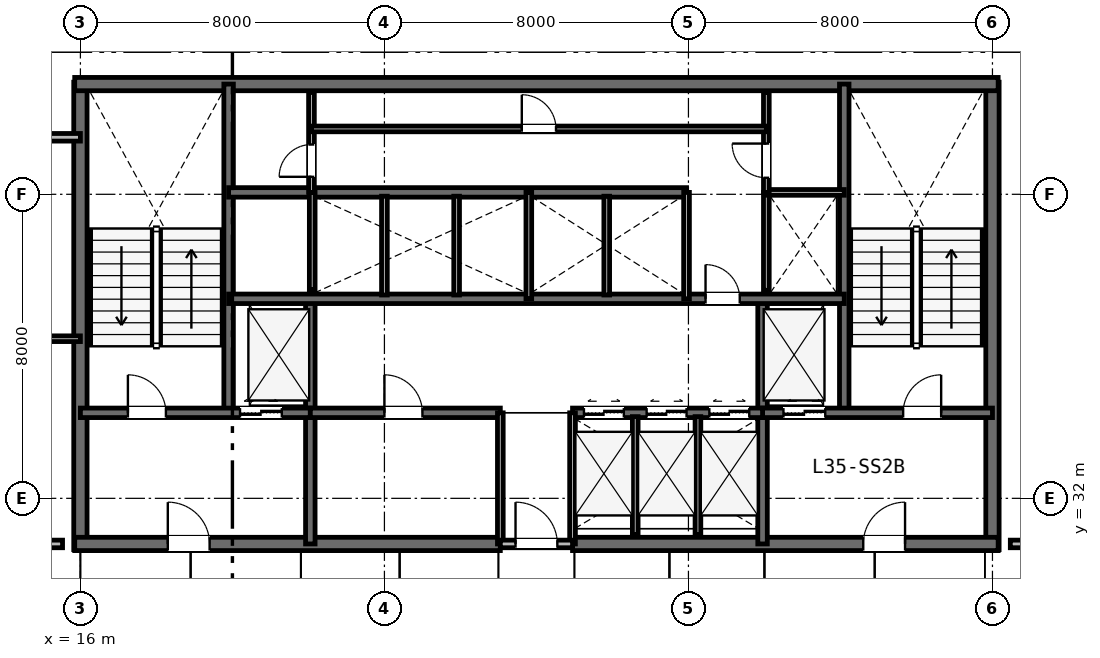
"""IFC4 building model, lengths in metres.
Left out: names, types, materials, properties, quantities, classifications, styles, units other than length and angle.
Written with IfcOpenShell. Run it as: python <this file> out.ifc"""

import sys

from ifc_helpers import new_model, si_unit, direction, frame, frame_2d, origin, place, context, subcontext, project, spatial, rectangle, extrude, element, fill, save


model = new_model("IFC4")
c1 = context("Model", 3, precision=1e-05, world=origin(), true_north=direction((0.0, 1.0)))
c2 = subcontext(c1, "Body", "Model", "MODEL_VIEW")
j1 = project(units=[si_unit("LENGTHUNIT", "METRE"), si_unit("PLANEANGLEUNIT", "RADIAN")], contexts=[c1])
p1 = place(None, origin())
s1 = spatial("IfcSite", under=j1, at=p1, CompositionType="ELEMENT")
p2 = place(p1, origin())
s2 = spatial("IfcBuilding", under=s1, at=p2, CompositionType="ELEMENT")
p3 = place(p2, frame((0.0, 0.0, 136.8)))
s3 = spatial("IfcBuildingStorey", under=s2, at=p3, CompositionType="ELEMENT", Elevation=136.8)
for number, where, z_axis, x_axis in (
    (1, (16.0, 30.65, 0.0), (0.0, 0.0, 1.0), (0.0, 1.0, 0.0)),
    (2, (40.0, 30.65, 0.0), (0.0, 0.0, 1.0), (0.0, 1.0, 0.0)),
):
    element("IfcWall", number, at=place(p3, frame(where, z_axis=z_axis, x_axis=x_axis)), inside=s3, PredefinedType="SHEAR", context=c2, shape_type="SweptSolid", body=[
        extrude(rectangle(XDim=12.3, YDim=0.35, at=frame_2d((6.15, 0.0))), origin(), (0.0, 0.0, 1.0), 3.6),
    ])
p4 = place(p3, frame((15.85, 42.9, 0.0), z_axis=(0.0, 0.0, 1.0), x_axis=(1.0, 0.0, 0.0)))
e3 = element("IfcWall", 3, at=p4, inside=s3, PredefinedType="SHEAR", context=c2, shape_type="SweptSolid", body=[
    extrude(rectangle(XDim=24.3, YDim=0.35, at=frame_2d((12.15, 0.0))), origin(), (0.0, 0.0, 1.0), 3.6),
])
p5 = place(p3, frame((15.85, 30.8, 0.0), z_axis=(0.0, 0.0, 1.0), x_axis=(1.0, 0.0, 0.0)))
e4 = element("IfcWall", 4, at=p5, inside=s3, PredefinedType="SHEAR", context=c2, shape_type="SweptSolid", body=[
    extrude(rectangle(XDim=11.2, YDim=0.35, at=frame_2d((5.6, 0.0))), origin(), (0.0, 0.0, 1.0), 3.6),
])
p6 = place(p5, frame((2.45, 0.0, 0.0)))
e5 = element("IfcOpeningElement", 5, at=p6, cuts=e4, PredefinedType="OPENING", context=c2, shape_type="SweptSolid", body=[
    extrude(rectangle(XDim=1.1, YDim=2.15, at=frame_2d((0.55, 1.075))), frame((0.0, 0.185, 0.0), z_axis=(0.0, -1.0, 0.0), x_axis=(1.0, 0.0, 0.0)), (0.0, 0.0, 1.0), 0.37),
])
p7 = place(p3, frame((28.95, 30.8, 0.0), z_axis=(0.0, 0.0, 1.0), x_axis=(1.0, 0.0, 0.0)))
e6 = element("IfcWall", 6, at=p7, inside=s3, PredefinedType="SHEAR", context=c2, shape_type="SweptSolid", body=[
    extrude(rectangle(XDim=11.2, YDim=0.35, at=frame_2d((5.6, 0.0))), origin(), (0.0, 0.0, 1.0), 3.6),
])
p8 = place(p7, frame((7.65, 0.0, 0.0)))
e7 = element("IfcOpeningElement", 7, at=p8, cuts=e6, PredefinedType="OPENING", context=c2, shape_type="SweptSolid", body=[
    extrude(rectangle(XDim=1.1, YDim=2.15, at=frame_2d((0.55, 1.075))), frame((0.0, 0.185, 0.0), z_axis=(0.0, -1.0, 0.0), x_axis=(1.0, 0.0, 0.0)), (0.0, 0.0, 1.0), 0.37),
])
for number, where, z_axis, x_axis in (
    (8, (19.9, 34.25, 0.0), (0.0, 0.0, 1.0), (0.0, 1.0, 0.0)),
    (9, (36.1, 34.25, 0.0), (0.0, 0.0, 1.0), (0.0, 1.0, 0.0)),
):
    element("IfcWall", number, at=place(p3, frame(where, z_axis=z_axis, x_axis=x_axis)), inside=s3, PredefinedType="SHEAR", context=c2, shape_type="SweptSolid", body=[
        extrude(rectangle(XDim=8.65, YDim=0.25, at=frame_2d((4.325, 0.0))), origin(), (0.0, 0.0, 1.0), 3.6),
    ])
for number, where, z_axis, x_axis in (
    (10, (22.05, 30.8, 0.0), (0.0, 0.0, 1.0), (0.0, 1.0, 0.0)),
    (11, (33.95, 30.8, 0.0), (0.0, 0.0, 1.0), (0.0, 1.0, 0.0)),
):
    element("IfcWall", number, at=place(p3, frame(where, z_axis=z_axis, x_axis=x_axis)), inside=s3, PredefinedType="SHEAR", context=c2, shape_type="SweptSolid", body=[
        extrude(rectangle(XDim=6.45, YDim=0.25, at=frame_2d((3.225, 0.0))), origin(), (0.0, 0.0, 1.0), 3.6),
    ])
p9 = place(p3, frame((16.0, 34.25, 0.0), z_axis=(0.0, 0.0, 1.0), x_axis=(1.0, 0.0, 0.0)))
e12 = element("IfcWall", 12, at=p9, inside=s3, PredefinedType="SHEAR", context=c2, shape_type="SweptSolid", body=[
    extrude(rectangle(XDim=6.05, YDim=0.25, at=frame_2d((3.025, 0.0))), origin(), (0.0, 0.0, 1.0), 3.6),
])
p10 = place(p9, frame((1.25, 0.0, 0.0)))
e13 = element("IfcOpeningElement", 13, at=p10, cuts=e12, PredefinedType="OPENING", context=c2, shape_type="SweptSolid", body=[
    extrude(rectangle(XDim=1.0, YDim=2.15, at=frame_2d((0.5, 1.075))), frame((0.0, 0.135, 0.0), z_axis=(0.0, -1.0, 0.0), x_axis=(1.0, 0.0, 0.0)), (0.0, 0.0, 1.0), 0.27),
])
p11 = place(p9, frame((4.2, 0.0, 0.0)))
e14 = element("IfcOpeningElement", 14, at=p11, cuts=e12, PredefinedType="OPENING", context=c2, shape_type="SweptSolid", body=[
    extrude(rectangle(XDim=1.1, YDim=2.15, at=frame_2d((0.55, 1.075))), frame((0.0, 0.135, 0.0), z_axis=(0.0, -1.0, 0.0), x_axis=(1.0, 0.0, 0.0)), (0.0, 0.0, 1.0), 0.27),
])
p12 = place(p3, frame((33.95, 34.25, 0.0), z_axis=(0.0, 0.0, 1.0), x_axis=(1.0, 0.0, 0.0)))
e15 = element("IfcWall", 15, at=p12, inside=s3, PredefinedType="SHEAR", context=c2, shape_type="SweptSolid", body=[
    extrude(rectangle(XDim=6.05, YDim=0.25, at=frame_2d((3.025, 0.0))), origin(), (0.0, 0.0, 1.0), 3.6),
])
p13 = place(p12, frame((3.7, 0.0, 0.0)))
e16 = element("IfcOpeningElement", 16, at=p13, cuts=e15, PredefinedType="OPENING", context=c2, shape_type="SweptSolid", body=[
    extrude(rectangle(XDim=1.0, YDim=2.15, at=frame_2d((0.5, 1.075))), frame((0.0, 0.135, 0.0), z_axis=(0.0, -1.0, 0.0), x_axis=(1.0, 0.0, 0.0)), (0.0, 0.0, 1.0), 0.27),
])
p14 = place(p12, frame((0.55, 0.0, 0.0)))
e17 = element("IfcOpeningElement", 17, at=p14, cuts=e15, PredefinedType="OPENING", context=c2, shape_type="SweptSolid", body=[
    extrude(rectangle(XDim=1.1, YDim=2.15, at=frame_2d((0.55, 1.075))), frame((0.0, 0.135, 0.0), z_axis=(0.0, -1.0, 0.0), x_axis=(1.0, 0.0, 0.0)), (0.0, 0.0, 1.0), 0.27),
])
p15 = place(p3, frame((22.05, 34.25, 0.0), z_axis=(0.0, 0.0, 1.0), x_axis=(1.0, 0.0, 0.0)))
e18 = element("IfcWall", 18, at=p15, inside=s3, PredefinedType="SHEAR", context=c2, shape_type="SweptSolid", body=[
    extrude(rectangle(XDim=5.0, YDim=0.25, at=frame_2d((2.5, 0.0))), origin(), (0.0, 0.0, 1.0), 3.6),
])
p16 = place(p15, frame((1.95, 0.0, 0.0)))
e19 = element("IfcOpeningElement", 19, at=p16, cuts=e18, PredefinedType="OPENING", context=c2, shape_type="SweptSolid", body=[
    extrude(rectangle(XDim=1.0, YDim=2.15, at=frame_2d((0.5, 1.075))), frame((0.0, 0.135, 0.0), z_axis=(0.0, -1.0, 0.0), x_axis=(1.0, 0.0, 0.0)), (0.0, 0.0, 1.0), 0.27),
])
p17 = place(p3, frame((28.95, 34.25, 0.0), z_axis=(0.0, 0.0, 1.0), x_axis=(1.0, 0.0, 0.0)))
e20 = element("IfcWall", 20, at=p17, inside=s3, PredefinedType="SHEAR", context=c2, shape_type="SweptSolid", body=[
    extrude(rectangle(XDim=5.0, YDim=0.25, at=frame_2d((2.5, 0.0))), origin(), (0.0, 0.0, 1.0), 3.6),
])
p18 = place(p17, frame((0.3, 0.0, 0.0)))
e21 = element("IfcOpeningElement", 21, at=p18, cuts=e20, PredefinedType="OPENING", context=c2, shape_type="SweptSolid", body=[
    extrude(rectangle(XDim=1.05, YDim=2.15, at=frame_2d((0.525, 1.075))), frame((0.0, 0.135, 0.0), z_axis=(0.0, -1.0, 0.0), x_axis=(1.0, 0.0, 0.0)), (0.0, 0.0, 1.0), 0.27),
])
p19 = place(p17, frame((1.95, 0.0, 0.0)))
e22 = element("IfcOpeningElement", 22, at=p19, cuts=e20, PredefinedType="OPENING", context=c2, shape_type="SweptSolid", body=[
    extrude(rectangle(XDim=1.05, YDim=2.15, at=frame_2d((0.525, 1.075))), frame((0.0, 0.135, 0.0), z_axis=(0.0, -1.0, 0.0), x_axis=(1.0, 0.0, 0.0)), (0.0, 0.0, 1.0), 0.27),
])
p20 = place(p17, frame((3.6, 0.0, 0.0)))
e23 = element("IfcOpeningElement", 23, at=p20, cuts=e20, PredefinedType="OPENING", context=c2, shape_type="SweptSolid", body=[
    extrude(rectangle(XDim=1.05, YDim=2.15, at=frame_2d((0.525, 1.075))), frame((0.0, 0.135, 0.0), z_axis=(0.0, -1.0, 0.0), x_axis=(1.0, 0.0, 0.0)), (0.0, 0.0, 1.0), 0.27),
])
p21 = place(p3, frame((19.9, 37.25, 0.0), z_axis=(0.0, 0.0, 1.0), x_axis=(1.0, 0.0, 0.0)))
e24 = element("IfcWall", 24, at=p21, inside=s3, PredefinedType="SHEAR", context=c2, shape_type="SweptSolid", body=[
    extrude(rectangle(XDim=16.2, YDim=0.25, at=frame_2d((8.1, 0.0))), origin(), (0.0, 0.0, 1.0), 3.6),
])
p22 = place(p21, frame((12.55, 0.0, 0.0)))
e25 = element("IfcOpeningElement", 25, at=p22, cuts=e24, PredefinedType="OPENING", context=c2, shape_type="SweptSolid", body=[
    extrude(rectangle(XDim=0.9, YDim=2.15, at=frame_2d((0.45, 1.075))), frame((0.0, 0.135, 0.0), z_axis=(0.0, -1.0, 0.0), x_axis=(1.0, 0.0, 0.0)), (0.0, 0.0, 1.0), 0.27),
])
p23 = place(p3, frame((19.9, 40.05, 0.0), z_axis=(0.0, 0.0, 1.0), x_axis=(1.0, 0.0, 0.0)))
e26 = element("IfcWall", 26, at=p23, inside=s3, PredefinedType="SHEAR", context=c2, shape_type="SweptSolid", body=[
    extrude(rectangle(XDim=12.05, YDim=0.25, at=frame_2d((6.025, 0.0))), origin(), (0.0, 0.0, 1.0), 3.6),
])
p24 = place(p3, frame((27.05, 30.8, 0.0), z_axis=(0.0, 0.0, 1.0), x_axis=(0.0, 1.0, 0.0)))
e27 = element("IfcWall", 27, at=p24, inside=s3, PredefinedType="PLUMBINGWALL", context=c2, shape_type="SweptSolid", body=[
    extrude(rectangle(XDim=3.45, YDim=0.15, at=frame_2d((1.725, 0.0))), origin(), (0.0, 0.0, 1.0), 2.96),
])
p25 = place(p3, frame((28.95, 30.8, 0.0), z_axis=(0.0, 0.0, 1.0), x_axis=(0.0, 1.0, 0.0)))
e28 = element("IfcWall", 28, at=p25, inside=s3, PredefinedType="PLUMBINGWALL", context=c2, shape_type="SweptSolid", body=[
    extrude(rectangle(XDim=3.45, YDim=0.15, at=frame_2d((1.725, 0.0))), origin(), (0.0, 0.0, 1.0), 3.33),
])
p26 = place(p3, frame((27.05, 30.8, 0.0), z_axis=(0.0, 0.0, 1.0), x_axis=(1.0, 0.0, 0.0)))
e29 = element("IfcWall", 29, at=p26, inside=s3, PredefinedType="PARTITIONING", context=c2, shape_type="SweptSolid", body=[
    extrude(rectangle(XDim=1.9, YDim=0.2, at=frame_2d((0.95, 0.0))), origin(), (0.0, 0.0, 1.0), 2.96),
])
p27 = place(p26, frame((0.4, 0.0, 0.0)))
e30 = element("IfcOpeningElement", 30, at=p27, cuts=e29, PredefinedType="OPENING", context=c2, shape_type="SweptSolid", body=[
    extrude(rectangle(XDim=1.1, YDim=2.15, at=frame_2d((0.55, 1.075))), frame((0.0, 0.11, 0.0), z_axis=(0.0, -1.0, 0.0), x_axis=(1.0, 0.0, 0.0)), (0.0, 0.0, 1.0), 0.22),
])
for number, where, z_axis, x_axis in (
    (31, (30.6, 31.05, 0.0), (0.0, 0.0, 1.0), (0.0, 1.0, 0.0)),
    (32, (32.25, 31.05, 0.0), (0.0, 0.0, 1.0), (0.0, 1.0, 0.0)),
):
    element("IfcWall", number, at=place(p3, frame(where, z_axis=z_axis, x_axis=x_axis)), inside=s3, PredefinedType="PLUMBINGWALL", context=c2, shape_type="SweptSolid", body=[
        extrude(rectangle(XDim=3.1, YDim=0.15, at=frame_2d((1.55, 0.0))), origin(), (0.0, 0.0, 1.0), 3.33),
    ])
p28 = place(p3, frame((22.1, 37.49, 0.0), z_axis=(0.0, 0.0, 1.0), x_axis=(0.0, 1.0, 0.0)))
e33 = element("IfcWall", 33, at=p28, inside=s3, PredefinedType="PLUMBINGWALL", context=c2, shape_type="SweptSolid", body=[
    extrude(rectangle(XDim=2.56, YDim=0.15, at=frame_2d((1.28, 0.0))), origin(), (0.0, 0.0, 1.0), 3.33),
])
p29 = place(p3, frame((27.8, 37.25, 0.0), z_axis=(0.0, 0.0, 1.0), x_axis=(0.0, 1.0, 0.0)))
e34 = element("IfcWall", 34, at=p29, inside=s3, PredefinedType="PLUMBINGWALL", context=c2, shape_type="SweptSolid", body=[
    extrude(rectangle(XDim=2.8, YDim=0.15, at=frame_2d((1.4, 0.0))), origin(), (0.0, 0.0, 1.0), 3.33),
])
for number, where, z_axis, x_axis in (
    (35, (24.0, 37.35, 0.0), (0.0, 0.0, 1.0), (0.0, 1.0, 0.0)),
    (36, (25.9, 37.35, 0.0), (0.0, 0.0, 1.0), (0.0, 1.0, 0.0)),
):
    element("IfcWall", number, at=place(p3, frame(where, z_axis=z_axis, x_axis=x_axis)), inside=s3, PredefinedType="PLUMBINGWALL", context=c2, shape_type="SweptSolid", body=[
        extrude(rectangle(XDim=2.6, YDim=0.15, at=frame_2d((1.3, 0.0))), origin(), (0.0, 0.0, 1.0), 3.33),
    ])
p30 = place(p3, frame((31.95, 37.25, 0.0), z_axis=(0.0, 0.0, 1.0), x_axis=(0.0, 1.0, 0.0)))
e37 = element("IfcWall", 37, at=p30, inside=s3, PredefinedType="PLUMBINGWALL", context=c2, shape_type="SweptSolid", body=[
    extrude(rectangle(XDim=2.8, YDim=0.15, at=frame_2d((1.4, 0.0))), origin(), (0.0, 0.0, 1.0), 3.33),
])
p31 = place(p3, frame((29.85, 37.35, 0.0), z_axis=(0.0, 0.0, 1.0), x_axis=(0.0, 1.0, 0.0)))
e38 = element("IfcWall", 38, at=p31, inside=s3, PredefinedType="PLUMBINGWALL", context=c2, shape_type="SweptSolid", body=[
    extrude(rectangle(XDim=2.6, YDim=0.15, at=frame_2d((1.3, 0.0))), origin(), (0.0, 0.0, 1.0), 3.33),
])
p32 = place(p3, frame((34.05, 37.473, 0.0), z_axis=(0.0, 0.0, 1.0), x_axis=(0.0, 1.0, 0.0)))
e39 = element("IfcWall", 39, at=p32, inside=s3, PredefinedType="PLUMBINGWALL", context=c2, shape_type="SweptSolid", body=[
    extrude(rectangle(XDim=2.577, YDim=0.15, at=frame_2d((1.288, 0.0))), origin(), (0.0, 0.0, 1.0), 3.33),
])
p33 = place(p3, frame((34.05, 40.05, 0.0), z_axis=(0.0, 0.0, 1.0), x_axis=(1.0, 0.0, 0.0)))
e40 = element("IfcWall", 40, at=p33, inside=s3, PredefinedType="PARTITIONING", context=c2, shape_type="SweptSolid", body=[
    extrude(rectangle(XDim=2.05, YDim=0.15, at=frame_2d((1.025, 0.0))), origin(), (0.0, 0.0, 1.0), 3.33),
])
p34 = place(p3, frame((34.05, 40.05, 0.0), z_axis=(0.0, 0.0, 1.0), x_axis=(0.0, 1.0, 0.0)))
e41 = element("IfcWall", 41, at=p34, inside=s3, PredefinedType="PARTITIONING", context=c2, shape_type="SweptSolid", body=[
    extrude(rectangle(XDim=2.63, YDim=0.15, at=frame_2d((1.315, 0.0))), origin(), (0.0, 0.0, 1.0), 3.33),
])
p35 = place(p34, frame((0.385, 0.0, 0.0)))
e42 = element("IfcOpeningElement", 42, at=p35, cuts=e41, PredefinedType="OPENING", context=c2, shape_type="SweptSolid", body=[
    extrude(rectangle(XDim=0.9, YDim=2.15, at=frame_2d((0.45, 1.075))), frame((0.0, 0.085, 0.0), z_axis=(0.0, -1.0, 0.0), x_axis=(1.0, 0.0, 0.0)), (0.0, 0.0, 1.0), 0.17),
])
p36 = place(p3, frame((22.08, 40.05, 0.0), z_axis=(0.0, 0.0, 1.0), x_axis=(0.0, 1.0, 0.0)))
e43 = element("IfcWall", 43, at=p36, inside=s3, PredefinedType="PARTITIONING", context=c2, shape_type="SweptSolid", body=[
    extrude(rectangle(XDim=2.63, YDim=0.15, at=frame_2d((1.315, 0.0))), origin(), (0.0, 0.0, 1.0), 3.33),
])
p37 = place(p36, frame((0.41, 0.0, 0.0)))
e44 = element("IfcOpeningElement", 44, at=p37, cuts=e43, PredefinedType="OPENING", context=c2, shape_type="SweptSolid", body=[
    extrude(rectangle(XDim=0.85, YDim=2.15, at=frame_2d((0.425, 1.075))), frame((0.0, 0.085, 0.0), z_axis=(0.0, -1.0, 0.0), x_axis=(1.0, 0.0, 0.0)), (0.0, 0.0, 1.0), 0.17),
])
p38 = place(p3, frame((22.08, 41.72, 0.0), z_axis=(0.0, 0.0, 1.0), x_axis=(1.0, 0.0, 0.0)))
e45 = element("IfcWall", 45, at=p38, inside=s3, PredefinedType="PARTITIONING", context=c2, shape_type="SweptSolid", body=[
    extrude(rectangle(XDim=11.97, YDim=0.15, at=frame_2d((5.985, 0.0))), origin(), (0.0, 0.0, 1.0), 3.33),
])
p39 = place(p38, frame((5.535, 0.0, 0.0)))
e46 = element("IfcOpeningElement", 46, at=p39, cuts=e45, PredefinedType="OPENING", context=c2, shape_type="SweptSolid", body=[
    extrude(rectangle(XDim=0.9, YDim=2.15, at=frame_2d((0.45, 1.075))), frame((0.0, 0.085, 0.0), z_axis=(0.0, -1.0, 0.0), x_axis=(1.0, 0.0, 0.0)), (0.0, 0.0, 1.0), 0.17),
])
p40 = place(p3, frame((11.4, 30.8, 0.0), z_axis=(0.0, 0.0, 1.0), x_axis=(1.0, 0.0, 0.0)))
e47 = element("IfcWall", 47, at=p40, inside=s3, PredefinedType="PARTITIONING", context=c2, shape_type="SweptSolid", body=[
    extrude(rectangle(XDim=4.13, YDim=0.2, at=frame_2d((2.065, 0.0))), origin(), (0.0, 0.0, 1.0), 2.93),
])
p41 = place(p3, frame((40.47, 30.8, 0.0), z_axis=(0.0, 0.0, 1.0), x_axis=(1.0, 0.0, 0.0)))
e48 = element("IfcWall", 48, at=p41, inside=s3, PredefinedType="PARTITIONING", context=c2, shape_type="SweptSolid", body=[
    extrude(rectangle(XDim=1.73, YDim=0.2, at=frame_2d((0.865, 0.0))), origin(), (0.0, 0.0, 1.0), 2.93),
])
p42 = place(p3, frame((0.1, 41.5, 0.0), z_axis=(0.0, 0.0, 1.0), x_axis=(1.0, 0.0, 0.0)))
e49 = element("IfcWall", 49, at=p42, inside=s3, PredefinedType="PARTITIONING", context=c2, shape_type="SweptSolid", body=[
    extrude(rectangle(XDim=15.9, YDim=0.2, at=frame_2d((7.95, 0.0))), origin(), (0.0, 0.0, 1.0), 2.93),
])
p43 = place(p42, frame((9.877, 0.0, 0.0)))
e50 = element("IfcOpeningElement", 50, at=p43, cuts=e49, PredefinedType="OPENING", context=c2, shape_type="SweptSolid", body=[
    extrude(rectangle(XDim=0.95, YDim=2.15, at=frame_2d((0.475, 1.075))), frame((0.0, 0.11, 0.0), z_axis=(0.0, -1.0, 0.0), x_axis=(1.0, 0.0, 0.0)), (0.0, 0.0, 1.0), 0.22),
])
p44 = place(p3, frame((11.4, 36.2, 0.0), z_axis=(0.0, 0.0, 1.0), x_axis=(1.0, 0.0, 0.0)))
e51 = element("IfcWall", 51, at=p44, inside=s3, PredefinedType="PARTITIONING", context=c2, shape_type="SweptSolid", body=[
    extrude(rectangle(XDim=4.6, YDim=0.15, at=frame_2d((2.3, 0.0))), origin(), (0.0, 0.0, 1.0), 3.33),
])
p45 = place(p27, origin())
e52 = element("IfcDoor", 52, at=p45, inside=s3, OperationType="SINGLE_SWING_LEFT", PredefinedType="DOOR", context=c2, shape_type="SweptSolid", body=[
    extrude(rectangle(XDim=1.1, YDim=2.15, at=frame_2d((0.55, 1.075))), frame((0.0, 0.025, 0.0), z_axis=(0.0, -1.0, 0.0), x_axis=(1.0, 0.0, 0.0)), (0.0, 0.0, 1.0), 0.05),
])
fill(e30, e52)
p46 = place(p10, origin())
e53 = element("IfcDoor", 53, at=p46, inside=s3, OperationType="SINGLE_SWING_LEFT", PredefinedType="DOOR", context=c2, shape_type="SweptSolid", body=[
    extrude(rectangle(XDim=1.0, YDim=2.15, at=frame_2d((0.5, 1.075))), frame((0.0, 0.025, 0.0), z_axis=(0.0, -1.0, 0.0), x_axis=(1.0, 0.0, 0.0)), (0.0, 0.0, 1.0), 0.05),
])
fill(e13, e53)
p47 = place(p13, origin())
e54 = element("IfcDoor", 54, at=p47, inside=s3, OperationType="SINGLE_SWING_RIGHT", PredefinedType="DOOR", context=c2, shape_type="SweptSolid", body=[
    extrude(rectangle(XDim=1.0, YDim=2.15, at=frame_2d((0.5, 1.075))), frame((0.0, 0.025, 0.0), z_axis=(0.0, -1.0, 0.0), x_axis=(1.0, 0.0, 0.0)), (0.0, 0.0, 1.0), 0.05),
])
fill(e16, e54)
p48 = place(p6, origin())
e55 = element("IfcDoor", 55, at=p48, inside=s3, OperationType="SINGLE_SWING_LEFT", PredefinedType="DOOR", context=c2, shape_type="SweptSolid", body=[
    extrude(rectangle(XDim=1.1, YDim=2.15, at=frame_2d((0.55, 1.075))), frame((0.0, 0.025, 0.0), z_axis=(0.0, -1.0, 0.0), x_axis=(1.0, 0.0, 0.0)), (0.0, 0.0, 1.0), 0.05),
])
fill(e5, e55)
p49 = place(p8, origin())
e56 = element("IfcDoor", 56, at=p49, inside=s3, OperationType="SINGLE_SWING_RIGHT", PredefinedType="DOOR", context=c2, shape_type="SweptSolid", body=[
    extrude(rectangle(XDim=1.1, YDim=2.15, at=frame_2d((0.55, 1.075))), frame((0.0, 0.025, 0.0), z_axis=(0.0, -1.0, 0.0), x_axis=(1.0, 0.0, 0.0)), (0.0, 0.0, 1.0), 0.05),
])
fill(e7, e56)
p50 = place(p16, origin())
e57 = element("IfcDoor", 57, at=p50, inside=s3, OperationType="SINGLE_SWING_LEFT", PredefinedType="DOOR", context=c2, shape_type="SweptSolid", body=[
    extrude(rectangle(XDim=1.0, YDim=2.15, at=frame_2d((0.5, 1.075))), frame((0.0, 0.025, 0.0), z_axis=(0.0, -1.0, 0.0), x_axis=(1.0, 0.0, 0.0)), (0.0, 0.0, 1.0), 0.05),
])
fill(e19, e57)
p51 = place(p22, origin())
e58 = element("IfcDoor", 58, at=p51, inside=s3, OperationType="SINGLE_SWING_LEFT", PredefinedType="DOOR", context=c2, shape_type="SweptSolid", body=[
    extrude(rectangle(XDim=0.9, YDim=2.15, at=frame_2d((0.45, 1.075))), frame((0.0, 0.025, 0.0), z_axis=(0.0, -1.0, 0.0), x_axis=(1.0, 0.0, 0.0)), (0.0, 0.0, 1.0), 0.05),
])
fill(e25, e58)
p52 = place(p35, origin())
e59 = element("IfcDoor", 59, at=p52, inside=s3, OperationType="SINGLE_SWING_RIGHT", PredefinedType="DOOR", context=c2, shape_type="SweptSolid", body=[
    extrude(rectangle(XDim=0.9, YDim=2.15, at=frame_2d((0.45, 1.075))), frame((0.0, 0.025, 0.0), z_axis=(0.0, -1.0, 0.0), x_axis=(1.0, 0.0, 0.0)), (0.0, 0.0, 1.0), 0.05),
])
fill(e42, e59)
p53 = place(p37, origin())
e60 = element("IfcDoor", 60, at=p53, inside=s3, OperationType="SINGLE_SWING_LEFT", PredefinedType="DOOR", context=c2, shape_type="SweptSolid", body=[
    extrude(rectangle(XDim=0.85, YDim=2.15, at=frame_2d((0.425, 1.075))), frame((0.0, 0.025, 0.0), z_axis=(0.0, -1.0, 0.0), x_axis=(1.0, 0.0, 0.0)), (0.0, 0.0, 1.0), 0.05),
])
fill(e44, e60)
p54 = place(p39, origin())
e61 = element("IfcDoor", 61, at=p54, inside=s3, OperationType="SINGLE_SWING_LEFT", PredefinedType="DOOR", context=c2, shape_type="SweptSolid", body=[
    extrude(rectangle(XDim=0.9, YDim=2.15, at=frame_2d((0.45, 1.075))), frame((0.0, 0.025, 0.0), z_axis=(0.0, -1.0, 0.0), x_axis=(1.0, 0.0, 0.0)), (0.0, 0.0, 1.0), 0.05),
])
fill(e46, e61)
p55 = place(p11, origin())
e62 = element("IfcDoor", 62, at=p55, inside=s3, OperationType="DOUBLE_DOOR_SLIDING", PredefinedType="DOOR", context=c2, shape_type="SweptSolid", body=[
    extrude(rectangle(XDim=1.1, YDim=2.15, at=frame_2d((0.55, 1.075))), frame((0.0, 0.025, 0.0), z_axis=(0.0, -1.0, 0.0), x_axis=(1.0, 0.0, 0.0)), (0.0, 0.0, 1.0), 0.05),
])
fill(e14, e62)
p56 = place(p14, origin())
e63 = element("IfcDoor", 63, at=p56, inside=s3, OperationType="DOUBLE_DOOR_SLIDING", PredefinedType="DOOR", context=c2, shape_type="SweptSolid", body=[
    extrude(rectangle(XDim=1.1, YDim=2.15, at=frame_2d((0.55, 1.075))), frame((0.0, 0.025, 0.0), z_axis=(0.0, -1.0, 0.0), x_axis=(1.0, 0.0, 0.0)), (0.0, 0.0, 1.0), 0.05),
])
fill(e17, e63)
p57 = place(p18, origin())
e64 = element("IfcDoor", 64, at=p57, inside=s3, OperationType="DOUBLE_DOOR_SLIDING", PredefinedType="DOOR", context=c2, shape_type="SweptSolid", body=[
    extrude(rectangle(XDim=1.05, YDim=2.15, at=frame_2d((0.525, 1.075))), frame((0.0, 0.025, 0.0), z_axis=(0.0, -1.0, 0.0), x_axis=(1.0, 0.0, 0.0)), (0.0, 0.0, 1.0), 0.05),
])
fill(e21, e64)
p58 = place(p19, origin())
e65 = element("IfcDoor", 65, at=p58, inside=s3, OperationType="DOUBLE_DOOR_SLIDING", PredefinedType="DOOR", context=c2, shape_type="SweptSolid", body=[
    extrude(rectangle(XDim=1.05, YDim=2.15, at=frame_2d((0.525, 1.075))), frame((0.0, 0.025, 0.0), z_axis=(0.0, -1.0, 0.0), x_axis=(1.0, 0.0, 0.0)), (0.0, 0.0, 1.0), 0.05),
])
fill(e22, e65)
p59 = place(p20, origin())
e66 = element("IfcDoor", 66, at=p59, inside=s3, OperationType="DOUBLE_DOOR_SLIDING", PredefinedType="DOOR", context=c2, shape_type="SweptSolid", body=[
    extrude(rectangle(XDim=1.05, YDim=2.15, at=frame_2d((0.525, 1.075))), frame((0.0, 0.025, 0.0), z_axis=(0.0, -1.0, 0.0), x_axis=(1.0, 0.0, 0.0)), (0.0, 0.0, 1.0), 0.05),
])
fill(e23, e66)
save(model, sys.argv[1])
